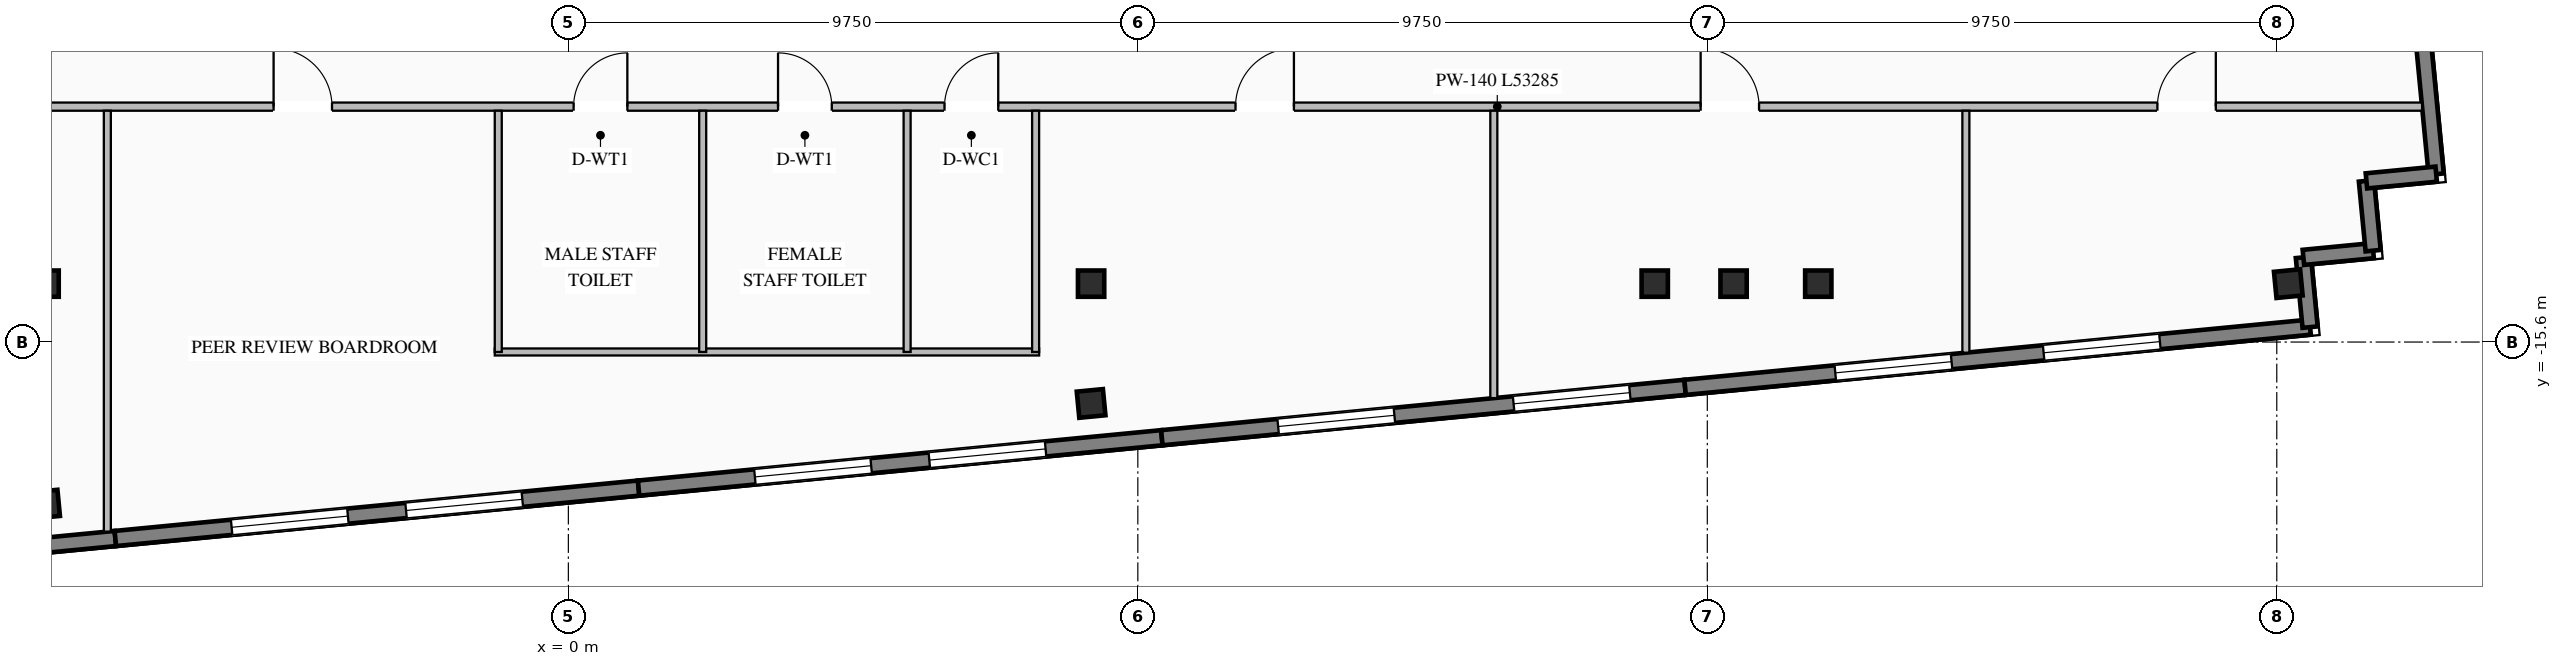
"""IFC4 building model, lengths in metres.
Left out: names, types, materials, properties, quantities, classifications, styles, units other than length and angle.
Written with IfcOpenShell. Run it as: python <this file> out.ifc"""

import sys

from ifc_helpers import new_model, si_unit, direction, frame, frame_2d, origin, origin_2d, place, context, subcontext, project, spatial, rectangle, i_section, extrude, element, fill, save


model = new_model("IFC4")
c1 = context("Model", 3, precision=1e-05, world=origin(), true_north=direction((0.0, 1.0)))
c2 = subcontext(c1, "Body", "Model", "MODEL_VIEW")
j1 = project(units=[si_unit("LENGTHUNIT", "METRE"), si_unit("PLANEANGLEUNIT", "RADIAN")], contexts=[c1])
p1 = place(None, origin())
s1 = spatial("IfcSite", under=j1, at=p1, CompositionType="ELEMENT")
p2 = place(p1, origin())
s2 = spatial("IfcBuilding", under=s1, at=p2, CompositionType="ELEMENT")
p3 = place(p2, frame((0.0, 0.0, 279.3)))
s3 = spatial("IfcBuildingStorey", under=s2, at=p3, CompositionType="ELEMENT", Elevation=279.3)
for number, where, z_axis, x_axis in (
    (1, (-8.95, -14.6, 0.0), (0.0, 0.0, 1.0), (1.0, 0.0, 0.0)),
    (2, (8.95, -14.6, 0.0), (0.0, 0.0, 1.0), (1.0, 0.0, 0.0)),
    (3, (18.6, -14.6, 0.0), (0.0, 0.0, 1.0), (1.0, 0.0, 0.0)),
    (4, (19.95, -14.6, 0.0), (0.0, 0.0, 1.0), (1.0, 0.0, 0.0)),
    (5, (21.4, -14.6, 0.0), (0.0, 0.0, 1.0), (1.0, 0.0, 0.0)),
    (6, (-8.95, -18.375, 0.0), (0.0, 0.0, 1.0), (0.995, 0.096, 0.0)),
    (7, (8.95, -16.651, 0.0), (0.0, 0.0, 1.0), (0.995, 0.096, 0.0)),
    (8, (29.447, -14.6, 0.0), (0.0, 0.0, 1.0), (0.995, 0.096, 0.0)),
):
    element("IfcColumn", number, at=place(p3, frame(where, z_axis=z_axis, x_axis=x_axis)), inside=s3, PredefinedType="COLUMN", context=c2, shape_type="SweptSolid", body=[
        extrude(i_section(OverallWidth=0.45, OverallDepth=0.45, WebThickness=0.022, FlangeThickness=0.032, at=origin_2d()), origin(), (0.0, 0.0, 1.0), 3.45),
    ])
p4 = place(p3, frame((-7.756, -18.963, 0.0), z_axis=(0.0, 0.0, 1.0), x_axis=(-0.995396745868, -0.095840066339, 0.0)))
e9 = element("IfcWall", 9, at=p4, inside=s3, PredefinedType="STANDARD", context=c2, shape_type="SweptSolid", body=[
    extrude(rectangle(XDim=10.75, YDim=0.26, at=frame_2d((5.375, 0.0))), origin(), (0.0, 0.0, 1.0), 3.25),
])
p5 = place(p4, frame((2.583, 0.0, 0.76)))
e10 = element("IfcOpeningElement", 10, at=p5, cuts=e9, PredefinedType="OPENING", context=c2, shape_type="SweptSolid", body=[
    extrude(rectangle(XDim=2.0, YDim=2.05, at=frame_2d((1.0, 1.025))), frame((0.0, 0.14, 0.0), z_axis=(0.0, -1.0, 0.0), x_axis=(1.0, 0.0, 0.0)), (0.0, 0.0, 1.0), 0.28),
])
p6 = place(p4, frame((7.717, 0.0, 0.76)))
e11 = element("IfcOpeningElement", 11, at=p6, cuts=e9, PredefinedType="OPENING", context=c2, shape_type="SweptSolid", body=[
    extrude(rectangle(XDim=2.0, YDim=2.05, at=frame_2d((1.0, 1.025))), frame((0.0, 0.14, 0.0), z_axis=(0.0, -1.0, 0.0), x_axis=(1.0, 0.0, 0.0)), (0.0, 0.0, 1.0), 0.28),
])
p7 = place(p3, frame((1.203, -18.101, 0.0), z_axis=(0.0, 0.0, 1.0), x_axis=(-0.995397043619, -0.095836973841, 0.0)))
e12 = element("IfcWall", 12, at=p7, inside=s3, PredefinedType="STANDARD", context=c2, shape_type="SweptSolid", body=[
    extrude(rectangle(XDim=9.0, YDim=0.26, at=frame_2d((4.5, 0.0))), origin(), (0.0, 0.0, 1.0), 3.25),
])
p8 = place(p7, frame((2.0, 0.0, 0.76)))
e13 = element("IfcOpeningElement", 13, at=p8, cuts=e12, PredefinedType="OPENING", context=c2, shape_type="SweptSolid", body=[
    extrude(rectangle(XDim=2.0, YDim=2.05, at=frame_2d((1.0, 1.025))), frame((0.0, 0.14, 0.0), z_axis=(0.0, -1.0, 0.0), x_axis=(1.0, 0.0, 0.0)), (0.0, 0.0, 1.0), 0.28),
])
p9 = place(p7, frame((5.0, 0.0, 0.76)))
e14 = element("IfcOpeningElement", 14, at=p9, cuts=e12, PredefinedType="OPENING", context=c2, shape_type="SweptSolid", body=[
    extrude(rectangle(XDim=2.0, YDim=2.05, at=frame_2d((1.0, 1.025))), frame((0.0, 0.14, 0.0), z_axis=(0.0, -1.0, 0.0), x_axis=(1.0, 0.0, 0.0)), (0.0, 0.0, 1.0), 0.28),
])
p10 = place(p3, frame((10.161, -17.238, 0.0), z_axis=(0.0, 0.0, 1.0), x_axis=(-0.995394206237, -0.095866439332, 0.0)))
e15 = element("IfcWall", 15, at=p10, inside=s3, PredefinedType="STANDARD", context=c2, shape_type="SweptSolid", body=[
    extrude(rectangle(XDim=9.0, YDim=0.26, at=frame_2d((4.5, 0.0))), origin(), (0.0, 0.0, 1.0), 3.25),
])
p11 = place(p10, frame((2.0, 0.0, 0.76)))
e16 = element("IfcOpeningElement", 16, at=p11, cuts=e15, PredefinedType="OPENING", context=c2, shape_type="SweptSolid", body=[
    extrude(rectangle(XDim=2.0, YDim=2.05, at=frame_2d((1.0, 1.025))), frame((0.0, 0.14, 0.0), z_axis=(0.0, -1.0, 0.0), x_axis=(1.0, 0.0, 0.0)), (0.0, 0.0, 1.0), 0.28),
])
p12 = place(p10, frame((5.0, 0.0, 0.76)))
e17 = element("IfcOpeningElement", 17, at=p12, cuts=e15, PredefinedType="OPENING", context=c2, shape_type="SweptSolid", body=[
    extrude(rectangle(XDim=2.0, YDim=2.05, at=frame_2d((1.0, 1.025))), frame((0.0, 0.14, 0.0), z_axis=(0.0, -1.0, 0.0), x_axis=(1.0, 0.0, 0.0)), (0.0, 0.0, 1.0), 0.28),
])
p13 = place(p3, frame((19.12, -16.375, 0.0), z_axis=(0.0, 0.0, 1.0), x_axis=(-0.995396794462, -0.09583956164, 0.0)))
e18 = element("IfcWall", 18, at=p13, inside=s3, PredefinedType="STANDARD", context=c2, shape_type="SweptSolid", body=[
    extrude(rectangle(XDim=9.0, YDim=0.26, at=frame_2d((4.5, 0.0))), origin(), (0.0, 0.0, 1.0), 3.25),
])
p14 = place(p13, frame((0.95, 0.0, 0.76)))
e19 = element("IfcOpeningElement", 19, at=p14, cuts=e18, PredefinedType="OPENING", context=c2, shape_type="SweptSolid", body=[
    extrude(rectangle(XDim=2.0, YDim=2.05, at=frame_2d((1.0, 1.025))), frame((0.0, 0.14, 0.0), z_axis=(0.0, -1.0, 0.0), x_axis=(1.0, 0.0, 0.0)), (0.0, 0.0, 1.0), 0.28),
])
p15 = place(p13, frame((5.0, 0.0, 0.76)))
e20 = element("IfcOpeningElement", 20, at=p15, cuts=e18, PredefinedType="OPENING", context=c2, shape_type="SweptSolid", body=[
    extrude(rectangle(XDim=2.0, YDim=2.05, at=frame_2d((1.0, 1.025))), frame((0.0, 0.14, 0.0), z_axis=(0.0, -1.0, 0.0), x_axis=(1.0, 0.0, 0.0)), (0.0, 0.0, 1.0), 0.28),
])
p16 = place(p3, frame((29.821, -15.345, 0.0), z_axis=(0.0, 0.0, 1.0), x_axis=(-0.995396954468, -0.095837899791, 0.0)))
e21 = element("IfcWall", 21, at=p16, inside=s3, PredefinedType="STANDARD", context=c2, shape_type="SweptSolid", body=[
    extrude(rectangle(XDim=10.75, YDim=0.26, at=frame_2d((5.375, 0.0))), origin(), (0.0, 0.0, 1.0), 3.25),
])
p17 = place(p16, frame((2.583, 0.0, 0.76)))
e22 = element("IfcOpeningElement", 22, at=p17, cuts=e21, PredefinedType="OPENING", context=c2, shape_type="SweptSolid", body=[
    extrude(rectangle(XDim=2.0, YDim=2.05, at=frame_2d((1.0, 1.025))), frame((0.0, 0.14, 0.0), z_axis=(0.0, -1.0, 0.0), x_axis=(1.0, 0.0, 0.0)), (0.0, 0.0, 1.0), 0.28),
])
p18 = place(p16, frame((6.167, 0.0, 0.76)))
e23 = element("IfcOpeningElement", 23, at=p18, cuts=e21, PredefinedType="OPENING", context=c2, shape_type="SweptSolid", body=[
    extrude(rectangle(XDim=2.0, YDim=2.05, at=frame_2d((1.0, 1.025))), frame((0.0, 0.14, 0.0), z_axis=(0.0, -1.0, 0.0), x_axis=(1.0, 0.0, 0.0)), (0.0, 0.0, 1.0), 0.28),
])
p19 = place(p3, frame((30.527, 2.354, 0.0), z_axis=(0.0, 0.0, 1.0), x_axis=(0.095850890337, -0.995395703638, 0.0)))
e24 = element("IfcWall", 24, at=p19, inside=s3, PredefinedType="STANDARD", context=c2, shape_type="SweptSolid", body=[
    extrude(rectangle(XDim=15.15, YDim=0.26, at=frame_2d((7.575, 0.0))), origin(), (0.0, 0.0, 1.0), 3.25),
])
p20 = place(p19, frame((3.3, 0.0, 0.76)))
e25 = element("IfcOpeningElement", 25, at=p20, cuts=e24, PredefinedType="OPENING", context=c2, shape_type="SweptSolid", body=[
    extrude(rectangle(XDim=1.4, YDim=1.95, at=frame_2d((0.7, 0.975))), frame((0.0, 0.14, 0.0), z_axis=(0.0, -1.0, 0.0), x_axis=(1.0, 0.0, 0.0)), (0.0, 0.0, 1.0), 0.28),
])
p21 = place(p19, frame((9.4, 0.0, 0.76)))
e26 = element("IfcOpeningElement", 26, at=p21, cuts=e24, PredefinedType="OPENING", context=c2, shape_type="SweptSolid", body=[
    extrude(rectangle(XDim=1.4, YDim=1.95, at=frame_2d((0.7, 0.975))), frame((0.0, 0.14, 0.0), z_axis=(0.0, -1.0, 0.0), x_axis=(1.0, 0.0, 0.0)), (0.0, 0.0, 1.0), 0.28),
])
for number, where, z_axis, x_axis in (
    (27, (29.821, -15.345, 0.0), (0.0, 0.0, 1.0), (-0.096, 0.995, 0.0)),
    (28, (29.705, -14.15, 0.0), (0.0, 0.0, 1.0), (0.995, 0.096, 0.0)),
):
    element("IfcWall", number, at=place(p3, frame(where, z_axis=z_axis, x_axis=x_axis)), inside=s3, PredefinedType="STANDARD", context=c2, shape_type="SweptSolid", body=[
        extrude(rectangle(XDim=1.2, YDim=0.26, at=frame_2d((0.6, 0.0))), origin(), (0.0, 0.0, 1.0), 2.565),
    ])
p22 = place(p3, frame((30.9, -14.035, 0.0), z_axis=(0.0, 0.0, 1.0), x_axis=(-0.095836473879, 0.995397091755, 0.0)))
e29 = element("IfcWall", 29, at=p22, inside=s3, PredefinedType="STANDARD", context=c2, shape_type="SweptSolid", body=[
    extrude(rectangle(XDim=1.2, YDim=0.26, at=frame_2d((0.6, 0.0))), origin(), (0.0, 0.0, 1.0), 2.565),
])
p23 = place(p3, frame((30.785, -12.841, 0.0), z_axis=(0.0, 0.0, 1.0), x_axis=(0.995398960025, 0.095817067274, 0.0)))
e30 = element("IfcWall", 30, at=p23, inside=s3, PredefinedType="STANDARD", context=c2, shape_type="SweptSolid", body=[
    extrude(rectangle(XDim=1.2, YDim=0.26, at=frame_2d((0.6, 0.0))), origin(), (0.0, 0.0, 1.0), 2.565),
])
p24 = place(p3, frame((-21.548, -11.57, 0.0), z_axis=(0.0, 0.0, 1.0), x_axis=(1.0, 0.0, 0.0)))
e31 = element("IfcWall", 31, at=p24, inside=s3, PredefinedType="STANDARD", context=c2, shape_type="SweptSolid", body=[
    extrude(rectangle(XDim=53.285, YDim=0.14, at=frame_2d((26.643, 0.0))), origin(), (0.0, 0.0, 1.0), 3.25),
])
p25 = place(p24, frame((21.638, 0.0, 0.0)))
e32 = element("IfcOpeningElement", 32, at=p25, cuts=e31, PredefinedType="OPENING", context=c2, shape_type="SweptSolid", body=[
    extrude(rectangle(XDim=0.92, YDim=2.08, at=frame_2d((0.46, 1.04))), frame((0.0, 0.08, 0.0), z_axis=(0.0, -1.0, 0.0), x_axis=(1.0, 0.0, 0.0)), (0.0, 0.0, 1.0), 0.16),
])
p26 = place(p24, frame((25.138, 0.0, 0.0)))
e33 = element("IfcOpeningElement", 33, at=p26, cuts=e31, PredefinedType="OPENING", context=c2, shape_type="SweptSolid", body=[
    extrude(rectangle(XDim=0.92, YDim=2.08, at=frame_2d((0.46, 1.04))), frame((0.0, 0.08, 0.0), z_axis=(0.0, -1.0, 0.0), x_axis=(1.0, 0.0, 0.0)), (0.0, 0.0, 1.0), 0.16),
])
p27 = place(p24, frame((27.988, 0.0, 0.0)))
e34 = element("IfcOpeningElement", 34, at=p27, cuts=e31, PredefinedType="OPENING", context=c2, shape_type="SweptSolid", body=[
    extrude(rectangle(XDim=0.92, YDim=2.08, at=frame_2d((0.46, 1.04))), frame((0.0, 0.08, 0.0), z_axis=(0.0, -1.0, 0.0), x_axis=(1.0, 0.0, 0.0)), (0.0, 0.0, 1.0), 0.16),
])
p28 = place(p24, frame((3.006, 0.0, 0.0)))
e35 = element("IfcOpeningElement", 35, at=p28, cuts=e31, PredefinedType="OPENING", context=c2, shape_type="SweptSolid", body=[
    extrude(rectangle(XDim=1.0, YDim=2.08, at=frame_2d((0.5, 1.04))), frame((0.0, 0.08, 0.0), z_axis=(0.0, -1.0, 0.0), x_axis=(1.0, 0.0, 0.0)), (0.0, 0.0, 1.0), 0.16),
])
p29 = place(p24, frame((9.708, 0.0, 0.0)))
e36 = element("IfcOpeningElement", 36, at=p29, cuts=e31, PredefinedType="OPENING", context=c2, shape_type="SweptSolid", body=[
    extrude(rectangle(XDim=1.0, YDim=2.08, at=frame_2d((0.5, 1.04))), frame((0.0, 0.08, 0.0), z_axis=(0.0, -1.0, 0.0), x_axis=(1.0, 0.0, 0.0)), (0.0, 0.0, 1.0), 0.16),
])
p30 = place(p24, frame((16.501, 0.0, 0.0)))
e37 = element("IfcOpeningElement", 37, at=p30, cuts=e31, PredefinedType="OPENING", context=c2, shape_type="SweptSolid", body=[
    extrude(rectangle(XDim=1.0, YDim=2.08, at=frame_2d((0.5, 1.04))), frame((0.0, 0.08, 0.0), z_axis=(0.0, -1.0, 0.0), x_axis=(1.0, 0.0, 0.0)), (0.0, 0.0, 1.0), 0.16),
])
p31 = place(p24, frame((32.97, 0.0, 0.0)))
e38 = element("IfcOpeningElement", 38, at=p31, cuts=e31, PredefinedType="OPENING", context=c2, shape_type="SweptSolid", body=[
    extrude(rectangle(XDim=1.0, YDim=2.08, at=frame_2d((0.5, 1.04))), frame((0.0, 0.08, 0.0), z_axis=(0.0, -1.0, 0.0), x_axis=(1.0, 0.0, 0.0)), (0.0, 0.0, 1.0), 0.16),
])
p32 = place(p24, frame((40.934, 0.0, 0.0)))
e39 = element("IfcOpeningElement", 39, at=p32, cuts=e31, PredefinedType="OPENING", context=c2, shape_type="SweptSolid", body=[
    extrude(rectangle(XDim=1.0, YDim=2.08, at=frame_2d((0.5, 1.04))), frame((0.0, 0.08, 0.0), z_axis=(0.0, -1.0, 0.0), x_axis=(1.0, 0.0, 0.0)), (0.0, 0.0, 1.0), 0.16),
])
p33 = place(p24, frame((48.754, 0.0, 0.0)))
e40 = element("IfcOpeningElement", 40, at=p33, cuts=e31, PredefinedType="OPENING", context=c2, shape_type="SweptSolid", body=[
    extrude(rectangle(XDim=1.0, YDim=2.08, at=frame_2d((0.5, 1.04))), frame((0.0, 0.08, 0.0), z_axis=(0.0, -1.0, 0.0), x_axis=(1.0, 0.0, 0.0)), (0.0, 0.0, 1.0), 0.16),
])
p34 = place(p3, frame((-1.26, -15.77, 0.0), z_axis=(0.0, 0.0, 1.0), x_axis=(1.0, 0.0, 0.0)))
e41 = element("IfcWall", 41, at=p34, inside=s3, PredefinedType="STANDARD", context=c2, shape_type="SweptSolid", body=[
    extrude(rectangle(XDim=9.32, YDim=0.12, at=frame_2d((4.66, 0.0))), origin(), (0.0, 0.0, 1.0), 3.25),
])
for number, where, z_axis, x_axis in (
    (42, (-1.2, -15.77, 0.0), (0.0, 0.0, 1.0), (0.0, 1.0, 0.0)),
    (43, (2.3, -15.77, 0.0), (0.0, 0.0, 1.0), (0.0, 1.0, 0.0)),
    (44, (5.8, -15.77, 0.0), (0.0, 0.0, 1.0), (0.0, 1.0, 0.0)),
    (45, (8.0, -15.77, 0.0), (0.0, 0.0, 1.0), (0.0, 1.0, 0.0)),
):
    element("IfcWall", number, at=place(p3, frame(where, z_axis=z_axis, x_axis=x_axis)), inside=s3, PredefinedType="STANDARD", context=c2, shape_type="SweptSolid", body=[
        extrude(rectangle(XDim=4.13, YDim=0.12, at=frame_2d((2.065, 0.0))), origin(), (0.0, 0.0, 1.0), 3.25),
    ])
p35 = place(p3, frame((-7.893, -18.846, 0.0), z_axis=(0.0, 0.0, 1.0), x_axis=(0.0, 1.0, 0.0)))
e46 = element("IfcWall", 46, at=p35, inside=s3, PredefinedType="STANDARD", context=c2, shape_type="SweptSolid", body=[
    extrude(rectangle(XDim=7.206, YDim=0.12, at=frame_2d((3.603, 0.0))), origin(), (0.0, 0.0, 1.0), 3.25),
])
p36 = place(p3, frame((15.845, -16.56, 0.0), z_axis=(0.0, 0.0, 1.0), x_axis=(0.0, 1.0, 0.0)))
e47 = element("IfcWall", 47, at=p36, inside=s3, PredefinedType="STANDARD", context=c2, shape_type="SweptSolid", body=[
    extrude(rectangle(XDim=4.92, YDim=0.12, at=frame_2d((2.46, 0.0))), origin(), (0.0, 0.0, 1.0), 3.25),
])
p37 = place(p3, frame((23.927, -15.782, 0.0), z_axis=(0.0, 0.0, 1.0), x_axis=(0.0, 1.0, 0.0)))
e48 = element("IfcWall", 48, at=p37, inside=s3, PredefinedType="STANDARD", context=c2, shape_type="SweptSolid", body=[
    extrude(rectangle(XDim=4.142, YDim=0.12, at=frame_2d((2.071, 0.0))), origin(), (0.0, 0.0, 1.0), 3.25),
])
p38 = place(p8, origin())
e49 = element("IfcWindow", 49, at=p38, inside=s3, PartitioningType="DOUBLE_PANEL_VERTICAL", PredefinedType="WINDOW", context=c2, shape_type="SweptSolid", body=[
    extrude(rectangle(XDim=2.0, YDim=2.05, at=frame_2d((1.0, 1.025))), frame((0.0, 0.03, 0.0), z_axis=(0.0, -1.0, 0.0), x_axis=(1.0, 0.0, 0.0)), (0.0, 0.0, 1.0), 0.06),
])
fill(e13, e49)
p39 = place(p9, origin())
e50 = element("IfcWindow", 50, at=p39, inside=s3, PartitioningType="DOUBLE_PANEL_VERTICAL", PredefinedType="WINDOW", context=c2, shape_type="SweptSolid", body=[
    extrude(rectangle(XDim=2.0, YDim=2.05, at=frame_2d((1.0, 1.025))), frame((0.0, 0.03, 0.0), z_axis=(0.0, -1.0, 0.0), x_axis=(1.0, 0.0, 0.0)), (0.0, 0.0, 1.0), 0.06),
])
fill(e14, e50)
p40 = place(p11, origin())
e51 = element("IfcWindow", 51, at=p40, inside=s3, PartitioningType="DOUBLE_PANEL_VERTICAL", PredefinedType="WINDOW", context=c2, shape_type="SweptSolid", body=[
    extrude(rectangle(XDim=2.0, YDim=2.05, at=frame_2d((1.0, 1.025))), frame((0.0, 0.03, 0.0), z_axis=(0.0, -1.0, 0.0), x_axis=(1.0, 0.0, 0.0)), (0.0, 0.0, 1.0), 0.06),
])
fill(e16, e51)
p41 = place(p12, origin())
e52 = element("IfcWindow", 52, at=p41, inside=s3, PartitioningType="DOUBLE_PANEL_VERTICAL", PredefinedType="WINDOW", context=c2, shape_type="SweptSolid", body=[
    extrude(rectangle(XDim=2.0, YDim=2.05, at=frame_2d((1.0, 1.025))), frame((0.0, 0.03, 0.0), z_axis=(0.0, -1.0, 0.0), x_axis=(1.0, 0.0, 0.0)), (0.0, 0.0, 1.0), 0.06),
])
fill(e17, e52)
p42 = place(p14, origin())
e53 = element("IfcWindow", 53, at=p42, inside=s3, PartitioningType="DOUBLE_PANEL_VERTICAL", PredefinedType="WINDOW", context=c2, shape_type="SweptSolid", body=[
    extrude(rectangle(XDim=2.0, YDim=2.05, at=frame_2d((1.0, 1.025))), frame((0.0, 0.03, 0.0), z_axis=(0.0, -1.0, 0.0), x_axis=(1.0, 0.0, 0.0)), (0.0, 0.0, 1.0), 0.06),
])
fill(e19, e53)
p43 = place(p15, origin())
e54 = element("IfcWindow", 54, at=p43, inside=s3, PartitioningType="DOUBLE_PANEL_VERTICAL", PredefinedType="WINDOW", context=c2, shape_type="SweptSolid", body=[
    extrude(rectangle(XDim=2.0, YDim=2.05, at=frame_2d((1.0, 1.025))), frame((0.0, 0.03, 0.0), z_axis=(0.0, -1.0, 0.0), x_axis=(1.0, 0.0, 0.0)), (0.0, 0.0, 1.0), 0.06),
])
fill(e20, e54)
p44 = place(p17, origin())
e55 = element("IfcWindow", 55, at=p44, inside=s3, PartitioningType="DOUBLE_PANEL_VERTICAL", PredefinedType="WINDOW", context=c2, shape_type="SweptSolid", body=[
    extrude(rectangle(XDim=2.0, YDim=2.05, at=frame_2d((1.0, 1.025))), frame((0.0, 0.03, 0.0), z_axis=(0.0, -1.0, 0.0), x_axis=(1.0, 0.0, 0.0)), (0.0, 0.0, 1.0), 0.06),
])
fill(e22, e55)
p45 = place(p18, origin())
e56 = element("IfcWindow", 56, at=p45, inside=s3, PartitioningType="DOUBLE_PANEL_VERTICAL", PredefinedType="WINDOW", context=c2, shape_type="SweptSolid", body=[
    extrude(rectangle(XDim=2.0, YDim=2.05, at=frame_2d((1.0, 1.025))), frame((0.0, 0.03, 0.0), z_axis=(0.0, -1.0, 0.0), x_axis=(1.0, 0.0, 0.0)), (0.0, 0.0, 1.0), 0.06),
])
fill(e23, e56)
p46 = place(p25, origin())
e57 = element("IfcDoor", 57, at=p46, inside=s3, OperationType="SINGLE_SWING_RIGHT", PredefinedType="DOOR", context=c2, shape_type="SweptSolid", body=[
    extrude(rectangle(XDim=0.92, YDim=2.08, at=frame_2d((0.46, 1.04))), frame((0.0, 0.025, 0.0), z_axis=(0.0, -1.0, 0.0), x_axis=(1.0, 0.0, 0.0)), (0.0, 0.0, 1.0), 0.05),
])
fill(e32, e57)
p47 = place(p26, origin())
e58 = element("IfcDoor", 58, at=p47, inside=s3, OperationType="SINGLE_SWING_LEFT", PredefinedType="DOOR", context=c2, shape_type="SweptSolid", body=[
    extrude(rectangle(XDim=0.92, YDim=2.08, at=frame_2d((0.46, 1.04))), frame((0.0, 0.025, 0.0), z_axis=(0.0, -1.0, 0.0), x_axis=(1.0, 0.0, 0.0)), (0.0, 0.0, 1.0), 0.05),
])
fill(e33, e58)
p48 = place(p27, origin())
e59 = element("IfcDoor", 59, at=p48, inside=s3, OperationType="SINGLE_SWING_RIGHT", PredefinedType="DOOR", context=c2, shape_type="SweptSolid", body=[
    extrude(rectangle(XDim=0.92, YDim=2.08, at=frame_2d((0.46, 1.04))), frame((0.0, 0.025, 0.0), z_axis=(0.0, -1.0, 0.0), x_axis=(1.0, 0.0, 0.0)), (0.0, 0.0, 1.0), 0.05),
])
fill(e34, e59)
p49 = place(p30, origin())
e60 = element("IfcDoor", 60, at=p49, inside=s3, OperationType="SINGLE_SWING_LEFT", PredefinedType="DOOR", context=c2, shape_type="SweptSolid", body=[
    extrude(rectangle(XDim=1.0, YDim=2.08, at=frame_2d((0.5, 1.04))), frame((0.0, 0.025, 0.0), z_axis=(0.0, -1.0, 0.0), x_axis=(1.0, 0.0, 0.0)), (0.0, 0.0, 1.0), 0.05),
])
fill(e37, e60)
p50 = place(p31, origin())
e61 = element("IfcDoor", 61, at=p50, inside=s3, OperationType="SINGLE_SWING_RIGHT", PredefinedType="DOOR", context=c2, shape_type="SweptSolid", body=[
    extrude(rectangle(XDim=1.0, YDim=2.08, at=frame_2d((0.5, 1.04))), frame((0.0, 0.025, 0.0), z_axis=(0.0, -1.0, 0.0), x_axis=(1.0, 0.0, 0.0)), (0.0, 0.0, 1.0), 0.05),
])
fill(e38, e61)
p51 = place(p32, origin())
e62 = element("IfcDoor", 62, at=p51, inside=s3, OperationType="SINGLE_SWING_LEFT", PredefinedType="DOOR", context=c2, shape_type="SweptSolid", body=[
    extrude(rectangle(XDim=1.0, YDim=2.08, at=frame_2d((0.5, 1.04))), frame((0.0, 0.025, 0.0), z_axis=(0.0, -1.0, 0.0), x_axis=(1.0, 0.0, 0.0)), (0.0, 0.0, 1.0), 0.05),
])
fill(e39, e62)
p52 = place(p33, origin())
e63 = element("IfcDoor", 63, at=p52, inside=s3, OperationType="SINGLE_SWING_RIGHT", PredefinedType="DOOR", context=c2, shape_type="SweptSolid", body=[
    extrude(rectangle(XDim=1.0, YDim=2.08, at=frame_2d((0.5, 1.04))), frame((0.0, 0.025, 0.0), z_axis=(0.0, -1.0, 0.0), x_axis=(1.0, 0.0, 0.0)), (0.0, 0.0, 1.0), 0.05),
])
fill(e40, e63)
save(model, sys.argv[1])
